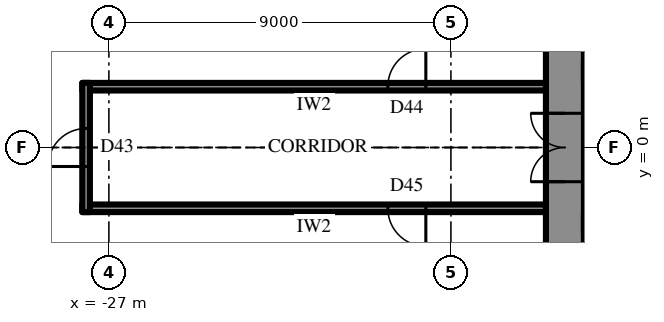
"""IFC4 building model, lengths in metres.
Left out: names, types, materials, properties, quantities, classifications, styles, units other than length and angle.
Written with IfcOpenShell. Run it as: python <this file> out.ifc"""

import sys

from ifc_helpers import new_model, si_unit, direction, frame, frame_2d, origin, place, context, subcontext, project, spatial, rectangle, extrude, element, fill, save


model = new_model("IFC4")
c1 = context("Model", 3, precision=1e-05, world=origin(), true_north=direction((0.0, 1.0)))
c2 = subcontext(c1, "Body", "Model", "MODEL_VIEW")
j1 = project(units=[si_unit("LENGTHUNIT", "METRE"), si_unit("PLANEANGLEUNIT", "RADIAN")], contexts=[c1])
p1 = place(None, origin())
s1 = spatial("IfcSite", under=j1, at=p1, CompositionType="ELEMENT")
p2 = place(p1, origin())
s2 = spatial("IfcBuilding", under=s1, at=p2, CompositionType="ELEMENT")
p3 = place(p2, frame((0.0, 0.0, 223.9)))
s3 = spatial("IfcBuildingStorey", under=s2, at=p3, CompositionType="ELEMENT", Elevation=223.9)
p4 = place(p3, frame((-15.0, 10.7, 0.0), z_axis=(0.0, 0.0, 1.0), x_axis=(0.0, -1.0, 0.0)))
e1 = element("IfcWall", 1, at=p4, inside=s3, PredefinedType="SHEAR", context=c2, shape_type="SweptSolid", body=[
    extrude(rectangle(XDim=21.4, YDim=1.0, at=frame_2d((10.7, 0.0))), origin(), (0.0, 0.0, 1.0), 4.2),
])
p5 = place(p4, frame((9.8, 0.0, 0.0)))
e2 = element("IfcOpeningElement", 2, at=p5, cuts=e1, PredefinedType="OPENING", context=c2, shape_type="SweptSolid", body=[
    extrude(rectangle(XDim=1.8, YDim=2.4, at=frame_2d((0.9, 1.2))), frame((0.0, 0.51, 0.0), z_axis=(0.0, -1.0, 0.0), x_axis=(1.0, 0.0, 0.0)), (0.0, 0.0, 1.0), 1.02),
])
p6 = place(p3, frame((-12.3, -2.0, 0.0), z_axis=(0.0, 0.0, 1.0), x_axis=(-1.0, 0.0, 0.0)))
e3 = element("IfcWall", 3, at=p6, inside=s3, PredefinedType="SHEAR", context=c2, shape_type="SweptSolid", body=[
    extrude(rectangle(XDim=2.2, YDim=0.5, at=frame_2d((1.1, 0.0))), origin(), (0.0, 0.0, 1.0), 4.2),
])
p7 = place(p6, frame((0.8, 0.0, 0.0)))
e4 = element("IfcOpeningElement", 4, at=p7, cuts=e3, PredefinedType="OPENING", context=c2, shape_type="SweptSolid", body=[
    extrude(rectangle(XDim=0.9, YDim=2.2, at=frame_2d((0.45, 1.1))), frame((0.0, 0.26, 0.0), z_axis=(0.0, -1.0, 0.0), x_axis=(1.0, 0.0, 0.0)), (0.0, 0.0, 1.0), 0.52),
])
p8 = place(p3, frame((-31.913, -2.425, 0.0), z_axis=(0.0, 0.0, 1.0), x_axis=(0.500001051461, -0.866024796723, 0.0)))
e5 = element("IfcWall", 5, at=p8, inside=s3, PredefinedType="SOLIDWALL", context=c2, shape_type="SweptSolid", body=[
    extrude(rectangle(XDim=27.713, YDim=0.3, at=frame_2d((13.856, 0.0))), origin(), (0.0, 0.0, 1.0), 2.0),
])
p9 = place(p8, frame((0.959, 0.0, 0.6)))
e6 = element("IfcOpeningElement", 6, at=p9, cuts=e5, PredefinedType="OPENING", context=c2, shape_type="SweptSolid", body=[
    extrude(rectangle(XDim=2.7, YDim=1.15, at=frame_2d((1.35, 0.575))), frame((0.0, 0.16, 0.0), z_axis=(0.0, -1.0, 0.0), x_axis=(1.0, 0.0, 0.0)), (0.0, 0.0, 1.0), 0.32),
])
p10 = place(p8, frame((5.578, 0.0, 0.6)))
e7 = element("IfcOpeningElement", 7, at=p10, cuts=e5, PredefinedType="OPENING", context=c2, shape_type="SweptSolid", body=[
    extrude(rectangle(XDim=2.7, YDim=1.15, at=frame_2d((1.35, 0.575))), frame((0.0, 0.16, 0.0), z_axis=(0.0, -1.0, 0.0), x_axis=(1.0, 0.0, 0.0)), (0.0, 0.0, 1.0), 0.32),
])
p11 = place(p8, frame((10.197, 0.0, 0.6)))
e8 = element("IfcOpeningElement", 8, at=p11, cuts=e5, PredefinedType="OPENING", context=c2, shape_type="SweptSolid", body=[
    extrude(rectangle(XDim=2.7, YDim=1.15, at=frame_2d((1.35, 0.575))), frame((0.0, 0.16, 0.0), z_axis=(0.0, -1.0, 0.0), x_axis=(1.0, 0.0, 0.0)), (0.0, 0.0, 1.0), 0.32),
])
p12 = place(p8, frame((14.816, 0.0, 0.6)))
e9 = element("IfcOpeningElement", 9, at=p12, cuts=e5, PredefinedType="OPENING", context=c2, shape_type="SweptSolid", body=[
    extrude(rectangle(XDim=2.7, YDim=1.15, at=frame_2d((1.35, 0.575))), frame((0.0, 0.16, 0.0), z_axis=(0.0, -1.0, 0.0), x_axis=(1.0, 0.0, 0.0)), (0.0, 0.0, 1.0), 0.32),
])
p13 = place(p8, frame((19.435, 0.0, 0.6)))
e10 = element("IfcOpeningElement", 10, at=p13, cuts=e5, PredefinedType="OPENING", context=c2, shape_type="SweptSolid", body=[
    extrude(rectangle(XDim=2.7, YDim=1.15, at=frame_2d((1.35, 0.575))), frame((0.0, 0.16, 0.0), z_axis=(0.0, -1.0, 0.0), x_axis=(1.0, 0.0, 0.0)), (0.0, 0.0, 1.0), 0.32),
])
p14 = place(p8, frame((24.053, 0.0, 0.6)))
e11 = element("IfcOpeningElement", 11, at=p14, cuts=e5, PredefinedType="OPENING", context=c2, shape_type="SweptSolid", body=[
    extrude(rectangle(XDim=2.7, YDim=1.15, at=frame_2d((1.35, 0.575))), frame((0.0, 0.16, 0.0), z_axis=(0.0, -1.0, 0.0), x_axis=(1.0, 0.0, 0.0)), (0.0, 0.0, 1.0), 0.32),
])
p15 = place(p3, frame((-15.5, 1.6, 0.0), z_axis=(0.0, 0.0, 1.0), x_axis=(-1.0, 0.0, 0.0)))
e12 = element("IfcWall", 12, at=p15, inside=s3, PredefinedType="PARTITIONING", context=c2, shape_type="SweptSolid", body=[
    extrude(rectangle(XDim=12.2, YDim=0.2, at=frame_2d((6.1, 0.0))), origin(), (0.0, 0.0, 1.0), 4.0),
])
p16 = place(p15, frame((3.16, 0.0, 0.0)))
e13 = element("IfcOpeningElement", 13, at=p16, cuts=e12, PredefinedType="OPENING", context=c2, shape_type="SweptSolid", body=[
    extrude(rectangle(XDim=1.0, YDim=2.2, at=frame_2d((0.5, 1.1))), frame((0.0, 0.11, 0.0), z_axis=(0.0, -1.0, 0.0), x_axis=(1.0, 0.0, 0.0)), (0.0, 0.0, 1.0), 0.22),
])
p17 = place(p3, frame((-15.5, -1.6, 0.0), z_axis=(0.0, 0.0, 1.0), x_axis=(-1.0, 0.0, 0.0)))
e14 = element("IfcWall", 14, at=p17, inside=s3, PredefinedType="PARTITIONING", context=c2, shape_type="SweptSolid", body=[
    extrude(rectangle(XDim=12.2, YDim=0.2, at=frame_2d((6.1, 0.0))), origin(), (0.0, 0.0, 1.0), 4.0),
])
p18 = place(p17, frame((3.16, 0.0, 0.0)))
e15 = element("IfcOpeningElement", 15, at=p18, cuts=e14, PredefinedType="OPENING", context=c2, shape_type="SweptSolid", body=[
    extrude(rectangle(XDim=1.0, YDim=2.2, at=frame_2d((0.5, 1.1))), frame((0.0, 0.11, 0.0), z_axis=(0.0, -1.0, 0.0), x_axis=(1.0, 0.0, 0.0)), (0.0, 0.0, 1.0), 0.22),
])
p19 = place(p3, frame((-27.6, -1.7, 0.0), z_axis=(0.0, 0.0, 1.0), x_axis=(0.0, 1.0, 0.0)))
e16 = element("IfcWall", 16, at=p19, inside=s3, PredefinedType="PARTITIONING", context=c2, shape_type="SweptSolid", body=[
    extrude(rectangle(XDim=3.4, YDim=0.2, at=frame_2d((1.7, 0.0))), origin(), (0.0, 0.0, 1.0), 4.0),
])
p20 = place(p19, frame((1.2, 0.0, 0.0)))
e17 = element("IfcOpeningElement", 17, at=p20, cuts=e16, PredefinedType="OPENING", context=c2, shape_type="SweptSolid", body=[
    extrude(rectangle(XDim=1.0, YDim=2.2, at=frame_2d((0.5, 1.1))), frame((0.0, 0.11, 0.0), z_axis=(0.0, -1.0, 0.0), x_axis=(1.0, 0.0, 0.0)), (0.0, 0.0, 1.0), 0.22),
])
p21 = place(p5, frame((1.8, 0.0, 0.0), z_axis=(0.0, 0.0, 1.0), x_axis=(-1.0, 0.0, 0.0)))
e18 = element("IfcDoor", 18, at=p21, inside=s3, OperationType="DOUBLE_DOOR_SINGLE_SWING", PredefinedType="DOOR", context=c2, shape_type="SweptSolid", body=[
    extrude(rectangle(XDim=1.8, YDim=2.4, at=frame_2d((0.9, 1.2))), frame((0.0, 0.025, 0.0), z_axis=(0.0, -1.0, 0.0), x_axis=(1.0, 0.0, 0.0)), (0.0, 0.0, 1.0), 0.05),
])
fill(e2, e18)
p22 = place(p16, frame((1.0, 0.0, 0.0), z_axis=(0.0, 0.0, 1.0), x_axis=(-1.0, 0.0, 0.0)))
e19 = element("IfcDoor", 19, at=p22, inside=s3, OperationType="SINGLE_SWING_LEFT", PredefinedType="DOOR", context=c2, shape_type="SweptSolid", body=[
    extrude(rectangle(XDim=1.0, YDim=2.2, at=frame_2d((0.5, 1.1))), frame((0.0, 0.025, 0.0), z_axis=(0.0, -1.0, 0.0), x_axis=(1.0, 0.0, 0.0)), (0.0, 0.0, 1.0), 0.05),
])
fill(e13, e19)
p23 = place(p18, origin())
e20 = element("IfcDoor", 20, at=p23, inside=s3, OperationType="SINGLE_SWING_RIGHT", PredefinedType="DOOR", context=c2, shape_type="SweptSolid", body=[
    extrude(rectangle(XDim=1.0, YDim=2.2, at=frame_2d((0.5, 1.1))), frame((0.0, 0.025, 0.0), z_axis=(0.0, -1.0, 0.0), x_axis=(1.0, 0.0, 0.0)), (0.0, 0.0, 1.0), 0.05),
])
fill(e15, e20)
p24 = place(p20, origin())
e21 = element("IfcDoor", 21, at=p24, inside=s3, OperationType="SINGLE_SWING_RIGHT", PredefinedType="DOOR", context=c2, shape_type="SweptSolid", body=[
    extrude(rectangle(XDim=1.0, YDim=2.2, at=frame_2d((0.5, 1.1))), frame((0.0, 0.025, 0.0), z_axis=(0.0, -1.0, 0.0), x_axis=(1.0, 0.0, 0.0)), (0.0, 0.0, 1.0), 0.05),
])
fill(e17, e21)
save(model, sys.argv[1])
